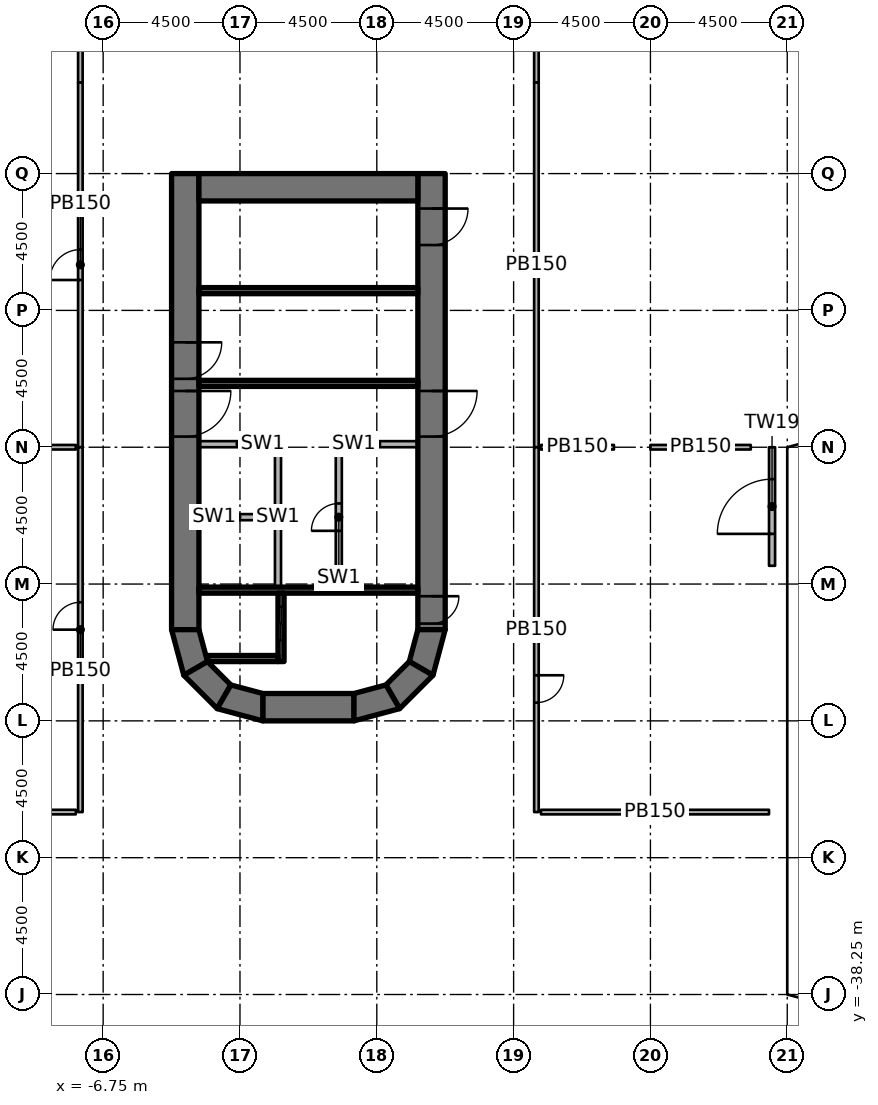
"""IFC4 building model, lengths in metres.
Left out: names, types, materials, properties, quantities, classifications, styles, units other than length and angle.
Written with IfcOpenShell. Run it as: python <this file> out.ifc"""

import sys

from ifc_helpers import new_model, si_unit, direction, frame, frame_2d, origin, origin_2d, place, context, subcontext, project, spatial, polyline, rectangle, outline, extrude, element, fill, save


model = new_model("IFC4")
c1 = context("Model", 3, precision=1e-05, world=origin(), true_north=direction((0.0, 1.0)))
c2 = subcontext(c1, "Body", "Model", "MODEL_VIEW")
j1 = project(units=[si_unit("LENGTHUNIT", "METRE"), si_unit("PLANEANGLEUNIT", "RADIAN")], contexts=[c1])
p1 = place(None, origin())
s1 = spatial("IfcSite", under=j1, at=p1, CompositionType="ELEMENT")
p2 = place(p1, origin())
s2 = spatial("IfcBuilding", under=s1, at=p2, CompositionType="ELEMENT")
p3 = place(p2, frame((0.0, 0.0, 17.0)))
s3 = spatial("IfcBuildingStorey", under=s2, at=p3, CompositionType="ELEMENT", Elevation=17.0)
for number, where, z_axis, x_axis in (
    (1, (-6.25, -26.9, 0.0), (0.0, 0.0, 1.0), (1.0, 0.0, 0.0)),
    (2, (-6.25, -24.65, 0.0), (0.0, 0.0, 1.0), (1.0, 0.0, 0.0)),
    (3, (-6.25, -20.25, 0.0), (0.0, 0.0, 1.0), (1.0, 0.0, 0.0)),
    (4, (-6.25, -15.75, 0.0), (0.0, 0.0, 1.0), (1.0, 0.0, 0.0)),
    (5, (-6.25, -10.75, 0.0), (0.0, 0.0, 1.0), (1.0, 0.0, 0.0)),
    (6, (-2.25, -33.11, 0.0), (0.0, 0.0, 1.0), (1.0, 0.0, 0.0)),
    (7, (2.25, -33.11, 0.0), (0.0, 0.0, 1.0), (1.0, 0.0, 0.0)),
    (8, (6.25, -26.9, 0.0), (0.0, 0.0, 1.0), (1.0, 0.0, 0.0)),
    (9, (6.25, -24.65, 0.0), (0.0, 0.0, 1.0), (1.0, 0.0, 0.0)),
    (10, (6.25, -20.25, 0.0), (0.0, 0.0, 1.0), (1.0, 0.0, 0.0)),
    (11, (6.25, -15.75, 0.0), (0.0, 0.0, 1.0), (1.0, 0.0, 0.0)),
    (12, (6.25, -10.75, 0.0), (0.0, 0.0, 1.0), (1.0, 0.0, 0.0)),
    (13, (10.65, -38.85, 0.0), (0.0, 0.0, 1.0), (1.0, 0.0, 0.0)),
    (14, (10.65, -33.75, 0.0), (0.0, 0.0, 1.0), (1.0, 0.0, 0.0)),
    (15, (10.65, -20.25, 0.0), (0.0, 0.0, 1.0), (1.0, 0.0, 0.0)),
    (16, (10.65, -15.15, 0.0), (0.0, 0.0, 1.0), (1.0, 0.0, 0.0)),
    (17, (15.367, -39.68, 0.0), (0.0, 0.0, 1.0), (1.0, 0.0, 0.0)),
    (18, (15.15, -24.75, 0.0), (0.0, 0.0, 1.0), (1.0, 0.0, 0.0)),
    (19, (15.15, -19.65, 0.0), (0.0, 0.0, 1.0), (1.0, 0.0, 0.0)),
    (20, (15.15, -10.65, 0.0), (0.0, 0.0, 1.0), (1.0, 0.0, 0.0)),
):
    element("IfcColumn", number, at=place(p3, frame(where, z_axis=z_axis, x_axis=x_axis)), inside=s3, PredefinedType="COLUMN", context=c2, shape_type="SweptSolid", body=[
        extrude(rectangle(XDim=1.2, YDim=1.2, at=origin_2d()), origin(), (0.0, 0.0, 1.0), 4.55),
    ])
p4 = place(p3, frame((-4.05, -11.25, 0.0), z_axis=(0.0, 0.0, 1.0), x_axis=(0.0, -1.0, 0.0)))
e21 = element("IfcWall", 21, at=p4, inside=s3, PredefinedType="SHEAR", context=c2, shape_type="SweptSolid", body=[
    extrude(rectangle(XDim=15.0, YDim=0.9, at=frame_2d((7.5, 0.0))), origin(), (0.0, 0.0, 1.0), 5.0),
])
p5 = place(p4, frame((7.15, 0.0, 0.0)))
e22 = element("IfcOpeningElement", 22, at=p5, cuts=e21, PredefinedType="OPENING", context=c2, shape_type="SweptSolid", body=[
    extrude(rectangle(XDim=1.5, YDim=2.3, at=frame_2d((0.75, 1.15))), frame((0.0, 0.46, 0.0), z_axis=(0.0, -1.0, 0.0), x_axis=(1.0, 0.0, 0.0)), (0.0, 0.0, 1.0), 0.92),
])
p6 = place(p4, frame((5.55, 0.0, 0.0)))
e23 = element("IfcOpeningElement", 23, at=p6, cuts=e21, PredefinedType="OPENING", context=c2, shape_type="SweptSolid", body=[
    extrude(rectangle(XDim=1.2, YDim=2.1, at=frame_2d((0.6, 1.05))), frame((0.0, 0.46, 0.0), z_axis=(0.0, -1.0, 0.0), x_axis=(1.0, 0.0, 0.0)), (0.0, 0.0, 1.0), 0.92),
])
p7 = place(p3, frame((4.05, -11.25, 0.0), z_axis=(0.0, 0.0, 1.0), x_axis=(0.0, -1.0, 0.0)))
e24 = element("IfcWall", 24, at=p7, inside=s3, PredefinedType="SHEAR", context=c2, shape_type="SweptSolid", body=[
    extrude(rectangle(XDim=15.0, YDim=0.9, at=frame_2d((7.5, 0.0))), origin(), (0.0, 0.0, 1.0), 5.0),
])
p8 = place(p7, frame((7.15, 0.0, 0.0)))
e25 = element("IfcOpeningElement", 25, at=p8, cuts=e24, PredefinedType="OPENING", context=c2, shape_type="SweptSolid", body=[
    extrude(rectangle(XDim=1.5, YDim=2.3, at=frame_2d((0.75, 1.15))), frame((0.0, 0.46, 0.0), z_axis=(0.0, -1.0, 0.0), x_axis=(1.0, 0.0, 0.0)), (0.0, 0.0, 1.0), 0.92),
])
p9 = place(p7, frame((13.9, 0.0, 0.0)))
e26 = element("IfcOpeningElement", 26, at=p9, cuts=e24, PredefinedType="OPENING", context=c2, shape_type="SweptSolid", body=[
    extrude(rectangle(XDim=0.9, YDim=2.1, at=frame_2d((0.45, 1.05))), frame((0.0, 0.46, 0.0), z_axis=(0.0, -1.0, 0.0), x_axis=(1.0, 0.0, 0.0)), (0.0, 0.0, 1.0), 0.92),
])
p10 = place(p7, frame((1.15, 0.0, 0.0)))
e27 = element("IfcOpeningElement", 27, at=p10, cuts=e24, PredefinedType="OPENING", context=c2, shape_type="SweptSolid", body=[
    extrude(rectangle(XDim=1.2, YDim=2.1, at=frame_2d((0.6, 1.05))), frame((0.0, 0.46, 0.0), z_axis=(0.0, -1.0, 0.0), x_axis=(1.0, 0.0, 0.0)), (0.0, 0.0, 1.0), 0.92),
])
p11 = place(p3, frame((-3.6, -11.7, 0.0), z_axis=(0.0, 0.0, 1.0), x_axis=(1.0, 0.0, 0.0)))
e28 = element("IfcWall", 28, at=p11, inside=s3, PredefinedType="SHEAR", context=c2, shape_type="SweptSolid", body=[
    extrude(rectangle(XDim=7.2, YDim=0.9, at=frame_2d((3.6, 0.0))), origin(), (0.0, 0.0, 1.0), 5.0),
])
p12 = place(p3, frame((-1.5, -28.8, 0.0), z_axis=(0.0, 0.0, 1.0), x_axis=(1.0, 0.0, 0.0)))
e29 = element("IfcWall", 29, at=p12, inside=s3, PredefinedType="SHEAR", context=c2, shape_type="SweptSolid", body=[
    extrude(rectangle(XDim=3.0, YDim=0.9, at=frame_2d((1.5, 0.0))), origin(), (0.0, 0.0, 1.0), 5.0),
])
p13 = place(p3, origin())
e30 = element("IfcWall", 30, at=p13, inside=s3, PredefinedType="SHEAR", context=c2, shape_type="SweptSolid", body=[
    extrude(outline(polyline([(-4.5, -26.25), (-4.098, -27.75), (-3.319, -27.3), (-3.6, -26.25), (-4.5, -26.25)])), origin(), (0.0, 0.0, 1.0), 5.0),
])
p14 = place(p3, origin())
e31 = element("IfcWall", 31, at=p14, inside=s3, PredefinedType="SHEAR", context=c2, shape_type="SweptSolid", body=[
    extrude(outline(polyline([(-4.098, -27.75), (-3.0, -28.848), (-2.55, -28.069), (-3.319, -27.3), (-4.098, -27.75)])), origin(), (0.0, 0.0, 1.0), 5.0),
])
p15 = place(p3, origin())
e32 = element("IfcWall", 32, at=p15, inside=s3, PredefinedType="SHEAR", context=c2, shape_type="SweptSolid", body=[
    extrude(outline(polyline([(-3.0, -28.848), (-1.5, -29.25), (-1.5, -28.35), (-2.55, -28.069), (-3.0, -28.848)])), origin(), (0.0, 0.0, 1.0), 5.0),
])
p16 = place(p3, origin())
e33 = element("IfcWall", 33, at=p16, inside=s3, PredefinedType="SHEAR", context=c2, shape_type="SweptSolid", body=[
    extrude(outline(polyline([(4.5, -26.25), (4.098, -27.75), (3.319, -27.3), (3.6, -26.25), (4.5, -26.25)])), origin(), (0.0, 0.0, 1.0), 5.0),
])
p17 = place(p3, origin())
e34 = element("IfcWall", 34, at=p17, inside=s3, PredefinedType="SHEAR", context=c2, shape_type="SweptSolid", body=[
    extrude(outline(polyline([(4.098, -27.75), (3.0, -28.848), (2.55, -28.069), (3.319, -27.3), (4.098, -27.75)])), origin(), (0.0, 0.0, 1.0), 5.0),
])
p18 = place(p3, origin())
e35 = element("IfcWall", 35, at=p18, inside=s3, PredefinedType="SHEAR", context=c2, shape_type="SweptSolid", body=[
    extrude(outline(polyline([(3.0, -28.848), (1.5, -29.25), (1.5, -28.35), (2.55, -28.069), (3.0, -28.848)])), origin(), (0.0, 0.0, 1.0), 5.0),
])
p19 = place(p3, frame((15.25, -24.15, 0.0), z_axis=(0.0, 0.0, 1.0), x_axis=(0.0, 1.0, 0.0)))
e36 = element("IfcWall", 36, at=p19, inside=s3, PredefinedType="SOLIDWALL", context=c2, shape_type="SweptSolid", body=[
    extrude(rectangle(XDim=3.9, YDim=0.2, at=frame_2d((1.95, 0.0))), origin(), (0.0, 0.0, 1.0), 4.55),
])
p20 = place(p19, frame((1.05, 0.0, 0.0)))
e37 = element("IfcOpeningElement", 37, at=p20, cuts=e36, PredefinedType="OPENING", context=c2, shape_type="SweptSolid", body=[
    extrude(rectangle(XDim=1.8, YDim=2.4, at=frame_2d((0.9, 1.2))), frame((0.0, 0.11, 0.0), z_axis=(0.0, -1.0, 0.0), x_axis=(1.0, 0.0, 0.0)), (0.0, 0.0, 1.0), 0.22),
])
p21 = place(p3, frame((3.6, -24.95, 0.0), z_axis=(0.0, 0.0, 1.0), x_axis=(-1.0, 0.0, 0.0)))
e38 = element("IfcWall", 38, at=p21, inside=s3, PredefinedType="SHEAR", context=c2, shape_type="SweptSolid", body=[
    extrude(rectangle(XDim=7.2, YDim=0.2, at=frame_2d((3.6, 0.0))), origin(), (0.0, 0.0, 1.0), 4.55),
])
p22 = place(p3, frame((-0.9, -27.3, 0.0), z_axis=(0.0, 0.0, 1.0), x_axis=(0.0, 1.0, 0.0)))
e39 = element("IfcWall", 39, at=p22, inside=s3, PredefinedType="SHEAR", context=c2, shape_type="SweptSolid", body=[
    extrude(rectangle(XDim=2.25, YDim=0.2, at=frame_2d((1.125, 0.0))), origin(), (0.0, 0.0, 1.0), 4.55),
])
p23 = place(p22, frame((0.7, 0.0, 0.0)))
e40 = element("IfcOpeningElement", 40, at=p23, cuts=e39, PredefinedType="OPENING", context=c2, shape_type="SweptSolid", body=[
    extrude(rectangle(XDim=1.1, YDim=2.3, at=frame_2d((0.55, 1.15))), frame((0.0, 0.11, 0.0), z_axis=(0.0, -1.0, 0.0), x_axis=(1.0, 0.0, 0.0)), (0.0, 0.0, 1.0), 0.22),
])
p24 = place(p3, origin())
e41 = element("IfcWall", 41, at=p24, inside=s3, PredefinedType="SHEAR", context=c2, shape_type="SweptSolid", body=[
    extrude(outline(polyline([(-1.0, -27.1), (-3.341, -27.1), (-3.291, -27.284), (-3.275, -27.3), (-1.0, -27.3), (-1.0, -27.1)])), origin(), (0.0, 0.0, 1.0), 4.55),
])
for number, where, z_axis, x_axis in (
    (42, (3.6, -18.15, 0.0), (0.0, 0.0, 1.0), (-1.0, 0.0, 0.0)),
    (43, (3.6, -15.1, 0.0), (0.0, 0.0, 1.0), (-1.0, 0.0, 0.0)),
):
    element("IfcWall", number, at=place(p3, frame(where, z_axis=z_axis, x_axis=x_axis)), inside=s3, PredefinedType="SHEAR", context=c2, shape_type="SweptSolid", body=[
        extrude(rectangle(XDim=7.2, YDim=0.2, at=frame_2d((3.6, 0.0))), origin(), (0.0, 0.0, 1.0), 4.55),
    ])
p25 = place(p3, frame((3.6, -20.15, 0.0), z_axis=(0.0, 0.0, 1.0), x_axis=(-1.0, 0.0, 0.0)))
e44 = element("IfcWall", 44, at=p25, inside=s3, PredefinedType="PARTITIONING", context=c2, shape_type="SweptSolid", body=[
    extrude(rectangle(XDim=2.7, YDim=0.2, at=frame_2d((1.35, 0.0))), origin(), (0.0, 0.0, 1.0), 4.55),
])
p26 = place(p3, frame((1.0, -24.85, 0.0), z_axis=(0.0, 0.0, 1.0), x_axis=(0.0, 1.0, 0.0)))
e45 = element("IfcWall", 45, at=p26, inside=s3, PredefinedType="PARTITIONING", context=c2, shape_type="SweptSolid", body=[
    extrude(rectangle(XDim=4.6, YDim=0.2, at=frame_2d((2.3, 0.0))), origin(), (0.0, 0.0, 1.0), 4.55),
])
p27 = place(p26, frame((1.85, 0.0, 0.0)))
e46 = element("IfcOpeningElement", 46, at=p27, cuts=e45, PredefinedType="OPENING", context=c2, shape_type="SweptSolid", body=[
    extrude(rectangle(XDim=0.9, YDim=2.1, at=frame_2d((0.45, 1.05))), frame((0.0, 0.11, 0.0), z_axis=(0.0, -1.0, 0.0), x_axis=(1.0, 0.0, 0.0)), (0.0, 0.0, 1.0), 0.22),
])
p28 = place(p3, frame((-0.9, -20.15, 0.0), z_axis=(0.0, 0.0, 1.0), x_axis=(-1.0, 0.0, 0.0)))
e47 = element("IfcWall", 47, at=p28, inside=s3, PredefinedType="PARTITIONING", context=c2, shape_type="SweptSolid", body=[
    extrude(rectangle(XDim=2.7, YDim=0.2, at=frame_2d((1.35, 0.0))), origin(), (0.0, 0.0, 1.0), 4.55),
])
p29 = place(p3, frame((-1.0, -24.85, 0.0), z_axis=(0.0, 0.0, 1.0), x_axis=(0.0, 1.0, 0.0)))
e48 = element("IfcWall", 48, at=p29, inside=s3, PredefinedType="PARTITIONING", context=c2, shape_type="SweptSolid", body=[
    extrude(rectangle(XDim=4.6, YDim=0.2, at=frame_2d((2.3, 0.0))), origin(), (0.0, 0.0, 1.0), 4.55),
])
p30 = place(p3, frame((-1.1, -22.55, 0.0), z_axis=(0.0, 0.0, 1.0), x_axis=(-1.0, 0.0, 0.0)))
e49 = element("IfcWall", 49, at=p30, inside=s3, PredefinedType="PARTITIONING", context=c2, shape_type="SweptSolid", body=[
    extrude(rectangle(XDim=2.5, YDim=0.2, at=frame_2d((1.25, 0.0))), origin(), (0.0, 0.0, 1.0), 4.55),
])
p31 = place(p3, frame((7.5, -8.25, 0.0), z_axis=(0.0, 0.0, 1.0), x_axis=(0.0, -1.0, 0.0)))
e50 = element("IfcWall", 50, at=p31, inside=s3, PredefinedType="PARTITIONING", context=c2, shape_type="SweptSolid", body=[
    extrude(rectangle(XDim=12.0, YDim=0.15, at=frame_2d((6.0, 0.0))), origin(), (0.0, 0.0, 1.0), 4.55),
])
p32 = place(p3, frame((7.5, -20.25, 0.0), z_axis=(0.0, 0.0, 1.0), x_axis=(0.0, -1.0, 0.0)))
e51 = element("IfcWall", 51, at=p32, inside=s3, PredefinedType="PARTITIONING", context=c2, shape_type="SweptSolid", body=[
    extrude(rectangle(XDim=12.0, YDim=0.15, at=frame_2d((6.0, 0.0))), origin(), (0.0, 0.0, 1.0), 4.55),
])
p33 = place(p32, frame((7.5, 0.0, 0.0)))
e52 = element("IfcOpeningElement", 52, at=p33, cuts=e51, PredefinedType="OPENING", context=c2, shape_type="SweptSolid", body=[
    extrude(rectangle(XDim=0.9, YDim=2.1, at=frame_2d((0.45, 1.05))), frame((0.0, 0.085, 0.0), z_axis=(0.0, -1.0, 0.0), x_axis=(1.0, 0.0, 0.0)), (0.0, 0.0, 1.0), 0.17),
])
p34 = place(p3, frame((-7.5, -20.25, 0.0), z_axis=(0.0, 0.0, 1.0), x_axis=(0.0, 1.0, 0.0)))
e53 = element("IfcWall", 53, at=p34, inside=s3, PredefinedType="PARTITIONING", context=c2, shape_type="SweptSolid", body=[
    extrude(rectangle(XDim=12.0, YDim=0.15, at=frame_2d((6.0, 0.0))), origin(), (0.0, 0.0, 1.0), 4.55),
])
p35 = place(p34, frame((5.5, 0.0, 0.0)))
e54 = element("IfcOpeningElement", 54, at=p35, cuts=e53, PredefinedType="OPENING", context=c2, shape_type="SweptSolid", body=[
    extrude(rectangle(XDim=1.0, YDim=2.1, at=frame_2d((0.5, 1.05))), frame((0.0, 0.085, 0.0), z_axis=(0.0, -1.0, 0.0), x_axis=(1.0, 0.0, 0.0)), (0.0, 0.0, 1.0), 0.17),
])
p36 = place(p3, frame((-7.5, -32.25, 0.0), z_axis=(0.0, 0.0, 1.0), x_axis=(0.0, 1.0, 0.0)))
e55 = element("IfcWall", 55, at=p36, inside=s3, PredefinedType="PARTITIONING", context=c2, shape_type="SweptSolid", body=[
    extrude(rectangle(XDim=12.0, YDim=0.15, at=frame_2d((6.0, 0.0))), origin(), (0.0, 0.0, 1.0), 4.55),
])
p37 = place(p36, frame((6.0, 0.0, 0.0)))
e56 = element("IfcOpeningElement", 56, at=p37, cuts=e55, PredefinedType="OPENING", context=c2, shape_type="SweptSolid", body=[
    extrude(rectangle(XDim=0.9, YDim=2.1, at=frame_2d((0.45, 1.05))), frame((0.0, 0.085, 0.0), z_axis=(0.0, -1.0, 0.0), x_axis=(1.0, 0.0, 0.0)), (0.0, 0.0, 1.0), 0.17),
])
p38 = place(p3, frame((14.55, -20.25, 0.0), z_axis=(0.0, 0.0, 1.0), x_axis=(-1.0, 0.0, 0.0)))
e57 = element("IfcWall", 57, at=p38, inside=s3, PredefinedType="PARTITIONING", context=c2, shape_type="SweptSolid", body=[
    extrude(rectangle(XDim=3.3, YDim=0.15, at=frame_2d((1.65, 0.0))), origin(), (0.0, 0.0, 1.0), 4.55),
])
p39 = place(p3, frame((10.05, -20.25, 0.0), z_axis=(0.0, 0.0, 1.0), x_axis=(-1.0, 0.0, 0.0)))
e58 = element("IfcWall", 58, at=p39, inside=s3, PredefinedType="PARTITIONING", context=c2, shape_type="SweptSolid", body=[
    extrude(rectangle(XDim=2.4, YDim=0.15, at=frame_2d((1.2, 0.0))), origin(), (0.0, 0.0, 1.0), 4.55),
])
p40 = place(p3, frame((7.5, -8.25, 0.0), z_axis=(0.0, 0.0, 1.0), x_axis=(0.0, 1.0, 0.0)))
e59 = element("IfcWall", 59, at=p40, inside=s3, PredefinedType="PARTITIONING", context=c2, shape_type="SweptSolid", body=[
    extrude(rectangle(XDim=6.6, YDim=0.15, at=frame_2d((3.3, 0.0))), origin(), (0.0, 0.0, 1.0), 4.55),
])
p41 = place(p3, frame((15.15, -32.25, 0.0), z_axis=(0.0, 0.0, 1.0), x_axis=(-1.0, 0.0, 0.0)))
e60 = element("IfcWall", 60, at=p41, inside=s3, PredefinedType="PARTITIONING", context=c2, shape_type="SweptSolid", body=[
    extrude(rectangle(XDim=7.5, YDim=0.15, at=frame_2d((3.75, 0.0))), origin(), (0.0, 0.0, 1.0), 4.55),
])
p42 = place(p3, frame((-7.65, -20.25, 0.0), z_axis=(0.0, 0.0, 1.0), x_axis=(-1.0, 0.0, 0.0)))
e61 = element("IfcWall", 61, at=p42, inside=s3, PredefinedType="PARTITIONING", context=c2, shape_type="SweptSolid", body=[
    extrude(rectangle(XDim=6.9, YDim=0.15, at=frame_2d((3.45, 0.0))), origin(), (0.0, 0.0, 1.0), 4.55),
])
p43 = place(p3, frame((-7.5, -1.65, 0.0), z_axis=(0.0, 0.0, 1.0), x_axis=(0.0, -1.0, 0.0)))
e62 = element("IfcWall", 62, at=p43, inside=s3, PredefinedType="PARTITIONING", context=c2, shape_type="SweptSolid", body=[
    extrude(rectangle(XDim=6.6, YDim=0.15, at=frame_2d((3.3, 0.0))), origin(), (0.0, 0.0, 1.0), 4.55),
])
p44 = place(p3, frame((-7.65, -32.25, 0.0), z_axis=(0.0, 0.0, 1.0), x_axis=(-1.0, 0.0, 0.0)))
e63 = element("IfcWall", 63, at=p44, inside=s3, PredefinedType="PARTITIONING", context=c2, shape_type="SweptSolid", body=[
    extrude(rectangle(XDim=7.5, YDim=0.15, at=frame_2d((3.75, 0.0))), origin(), (0.0, 0.0, 1.0), 4.55),
])
p45 = place(p20, origin())
e64 = element("IfcDoor", 64, at=p45, inside=s3, OperationType="SINGLE_SWING_LEFT", PredefinedType="DOOR", context=c2, shape_type="SweptSolid", body=[
    extrude(rectangle(XDim=1.8, YDim=2.4, at=frame_2d((0.9, 1.2))), frame((0.0, 0.025, 0.0), z_axis=(0.0, -1.0, 0.0), x_axis=(1.0, 0.0, 0.0)), (0.0, 0.0, 1.0), 0.05),
])
fill(e37, e64)
p46 = place(p8, origin())
e65 = element("IfcDoor", 65, at=p46, inside=s3, OperationType="DOUBLE_DOOR_SINGLE_SWING", PredefinedType="DOOR", context=c2, shape_type="SweptSolid", body=[
    extrude(rectangle(XDim=1.5, YDim=2.3, at=frame_2d((0.75, 1.15))), frame((0.0, 0.025, 0.0), z_axis=(0.0, -1.0, 0.0), x_axis=(1.0, 0.0, 0.0)), (0.0, 0.0, 1.0), 0.05),
])
fill(e25, e65)
p47 = place(p5, origin())
e66 = element("IfcDoor", 66, at=p47, inside=s3, OperationType="DOUBLE_DOOR_SINGLE_SWING", PredefinedType="DOOR", context=c2, shape_type="SweptSolid", body=[
    extrude(rectangle(XDim=1.5, YDim=2.3, at=frame_2d((0.75, 1.15))), frame((0.0, 0.025, 0.0), z_axis=(0.0, -1.0, 0.0), x_axis=(1.0, 0.0, 0.0)), (0.0, 0.0, 1.0), 0.05),
])
fill(e22, e66)
p48 = place(p9, origin())
e67 = element("IfcDoor", 67, at=p48, inside=s3, OperationType="SINGLE_SWING_LEFT", PredefinedType="DOOR", context=c2, shape_type="SweptSolid", body=[
    extrude(rectangle(XDim=0.9, YDim=2.1, at=frame_2d((0.45, 1.05))), frame((0.0, 0.025, 0.0), z_axis=(0.0, -1.0, 0.0), x_axis=(1.0, 0.0, 0.0)), (0.0, 0.0, 1.0), 0.05),
])
fill(e26, e67)
p49 = place(p6, origin())
e68 = element("IfcDoor", 68, at=p49, inside=s3, OperationType="SINGLE_SWING_LEFT", PredefinedType="DOOR", context=c2, shape_type="SweptSolid", body=[
    extrude(rectangle(XDim=1.2, YDim=2.1, at=frame_2d((0.6, 1.05))), frame((0.0, 0.025, 0.0), z_axis=(0.0, -1.0, 0.0), x_axis=(1.0, 0.0, 0.0)), (0.0, 0.0, 1.0), 0.05),
])
fill(e23, e68)
p50 = place(p10, origin())
e69 = element("IfcDoor", 69, at=p50, inside=s3, OperationType="SINGLE_SWING_LEFT", PredefinedType="DOOR", context=c2, shape_type="SweptSolid", body=[
    extrude(rectangle(XDim=1.2, YDim=2.1, at=frame_2d((0.6, 1.05))), frame((0.0, 0.025, 0.0), z_axis=(0.0, -1.0, 0.0), x_axis=(1.0, 0.0, 0.0)), (0.0, 0.0, 1.0), 0.05),
])
fill(e27, e69)
p51 = place(p23, origin())
e70 = element("IfcDoor", 70, at=p51, inside=s3, OperationType="DOUBLE_DOOR_SLIDING", PredefinedType="DOOR", context=c2, shape_type="SweptSolid", body=[
    extrude(rectangle(XDim=1.1, YDim=2.3, at=frame_2d((0.55, 1.15))), frame((0.0, 0.025, 0.0), z_axis=(0.0, -1.0, 0.0), x_axis=(1.0, 0.0, 0.0)), (0.0, 0.0, 1.0), 0.05),
])
fill(e40, e70)
p52 = place(p27, origin())
e71 = element("IfcDoor", 71, at=p52, inside=s3, OperationType="SINGLE_SWING_LEFT", PredefinedType="DOOR", context=c2, shape_type="SweptSolid", body=[
    extrude(rectangle(XDim=0.9, YDim=2.1, at=frame_2d((0.45, 1.05))), frame((0.0, 0.025, 0.0), z_axis=(0.0, -1.0, 0.0), x_axis=(1.0, 0.0, 0.0)), (0.0, 0.0, 1.0), 0.05),
])
fill(e46, e71)
p53 = place(p33, origin())
e72 = element("IfcDoor", 72, at=p53, inside=s3, OperationType="SINGLE_SWING_LEFT", PredefinedType="DOOR", context=c2, shape_type="SweptSolid", body=[
    extrude(rectangle(XDim=0.9, YDim=2.1, at=frame_2d((0.45, 1.05))), frame((0.0, 0.025, 0.0), z_axis=(0.0, -1.0, 0.0), x_axis=(1.0, 0.0, 0.0)), (0.0, 0.0, 1.0), 0.05),
])
fill(e52, e72)
p54 = place(p35, origin())
e73 = element("IfcDoor", 73, at=p54, inside=s3, OperationType="SINGLE_SWING_LEFT", PredefinedType="DOOR", context=c2, shape_type="SweptSolid", body=[
    extrude(rectangle(XDim=1.0, YDim=2.1, at=frame_2d((0.5, 1.05))), frame((0.0, 0.025, 0.0), z_axis=(0.0, -1.0, 0.0), x_axis=(1.0, 0.0, 0.0)), (0.0, 0.0, 1.0), 0.05),
])
fill(e54, e73)
p55 = place(p37, origin())
e74 = element("IfcDoor", 74, at=p55, inside=s3, OperationType="SINGLE_SWING_LEFT", PredefinedType="DOOR", context=c2, shape_type="SweptSolid", body=[
    extrude(rectangle(XDim=0.9, YDim=2.1, at=frame_2d((0.45, 1.05))), frame((0.0, 0.025, 0.0), z_axis=(0.0, -1.0, 0.0), x_axis=(1.0, 0.0, 0.0)), (0.0, 0.0, 1.0), 0.05),
])
fill(e56, e74)
save(model, sys.argv[1])
